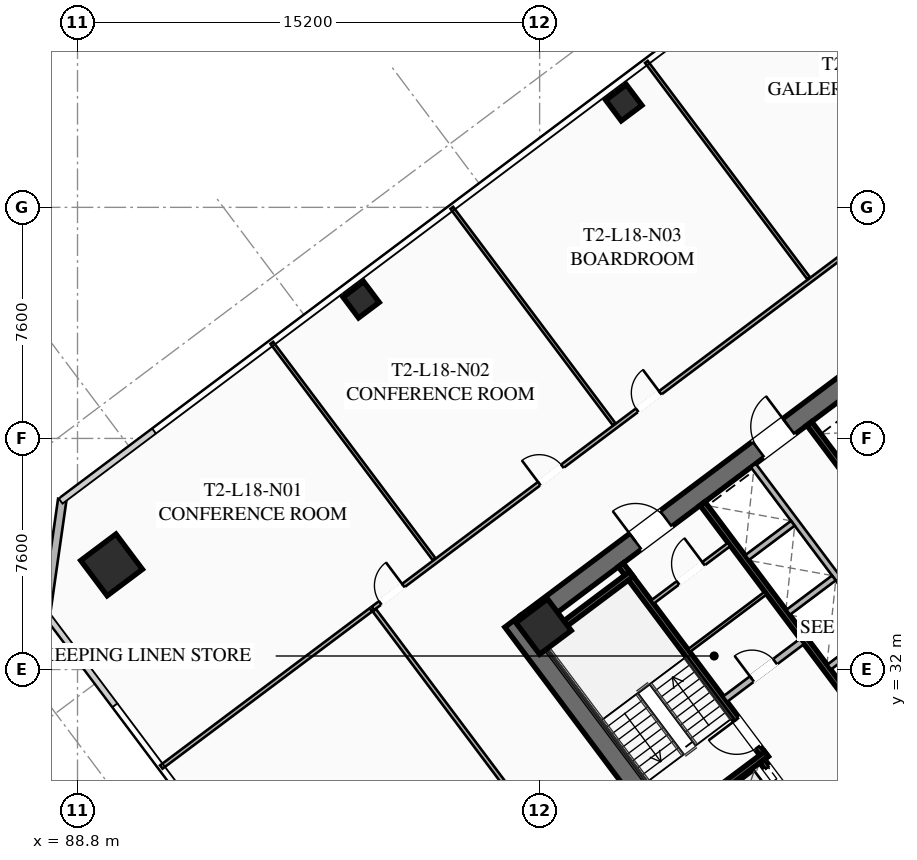
"""IFC4 building model, lengths in metres.
Left out: names, types, materials, properties, quantities, classifications, styles, units other than length and angle.
Written with IfcOpenShell. Run it as: python <this file> out.ifc"""

import sys

from ifc_helpers import new_model, si_unit, direction, frame, frame_2d, origin, origin_2d, place, context, subcontext, project, spatial, rectangle, hollow_rectangle, extrude, element, fill, save


model = new_model("IFC4")
c1 = context("Model", 3, precision=1e-05, world=origin(), true_north=direction((0.0, 1.0)))
c2 = subcontext(c1, "Body", "Model", "MODEL_VIEW")
j1 = project(units=[si_unit("LENGTHUNIT", "METRE"), si_unit("PLANEANGLEUNIT", "RADIAN")], contexts=[c1])
p1 = place(None, origin())
s1 = spatial("IfcSite", under=j1, at=p1, CompositionType="ELEMENT")
p2 = place(p1, origin())
s2 = spatial("IfcBuilding", under=s1, at=p2, CompositionType="ELEMENT")
p3 = place(p2, frame((0.0, 0.0, 70.75)))
s3 = spatial("IfcBuildingStorey", under=s2, at=p3, CompositionType="ELEMENT", Elevation=70.75)
p4 = place(p3, frame((112.476, 21.107, 0.0), z_axis=(0.0, 0.0, 1.0), x_axis=(-0.600005007985, 0.799996243986, 0.0)))
e1 = element("IfcWall", 1, at=p4, inside=s3, PredefinedType="SHEAR", context=c2, shape_type="SweptSolid", body=[
    extrude(rectangle(XDim=15.6, YDim=0.65, at=frame_2d((7.8, 0.0))), origin(), (0.0, 0.0, 1.0), 3.55),
])
p5 = place(p3, frame((124.429, 30.478, 0.0), z_axis=(0.0, 0.0, 1.0), x_axis=(-0.799998028465, -0.600002628705, 0.0)))
e2 = element("IfcWall", 2, at=p5, inside=s3, PredefinedType="SHEAR", context=c2, shape_type="SweptSolid", body=[
    extrude(rectangle(XDim=14.86, YDim=0.65, at=frame_2d((7.43, 0.0))), origin(), (0.0, 0.0, 1.0), 3.55),
])
p6 = place(p5, frame((9.13, 0.0, 0.0)))
e3 = element("IfcOpeningElement", 3, at=p6, cuts=e2, PredefinedType="OPENING", context=c2, shape_type="SweptSolid", body=[
    extrude(rectangle(XDim=1.25, YDim=2.25, at=frame_2d((0.625, 1.125))), frame((0.0, 0.335, 0.0), z_axis=(0.0, -1.0, 0.0), x_axis=(1.0, 0.0, 0.0)), (0.0, 0.0, 1.0), 0.67),
])
p7 = place(p5, frame((4.08, 0.0, 0.0)))
e4 = element("IfcOpeningElement", 4, at=p7, cuts=e2, PredefinedType="OPENING", context=c2, shape_type="SweptSolid", body=[
    extrude(rectangle(XDim=1.25, YDim=2.25, at=frame_2d((0.625, 1.125))), frame((0.0, 0.335, 0.0), z_axis=(0.0, -1.0, 0.0), x_axis=(1.0, 0.0, 0.0)), (0.0, 0.0, 1.0), 0.67),
])
p8 = place(p3, frame((103.571, 33.522, 0.0), z_axis=(0.0, 0.0, 1.0), x_axis=(0.799998028465, 0.600002628705, 0.0)))
e5 = element("IfcWall", 5, at=p8, inside=s3, PredefinedType="SHEAR", context=c2, shape_type="SweptSolid", body=[
    extrude(rectangle(XDim=14.86, YDim=0.65, at=frame_2d((7.43, 0.0))), origin(), (0.0, 0.0, 1.0), 3.55),
])
p9 = place(p8, frame((4.48, 0.0, 0.0)))
e6 = element("IfcOpeningElement", 6, at=p9, cuts=e5, PredefinedType="OPENING", context=c2, shape_type="SweptSolid", body=[
    extrude(rectangle(XDim=1.25, YDim=2.25, at=frame_2d((0.625, 1.125))), frame((0.0, 0.335, 0.0), z_axis=(0.0, -1.0, 0.0), x_axis=(1.0, 0.0, 0.0)), (0.0, 0.0, 1.0), 0.67),
])
p10 = place(p8, frame((9.53, 0.0, 0.0)))
e7 = element("IfcOpeningElement", 7, at=p10, cuts=e5, PredefinedType="OPENING", context=c2, shape_type="SweptSolid", body=[
    extrude(rectangle(XDim=1.25, YDim=2.25, at=frame_2d((0.625, 1.125))), frame((0.0, 0.335, 0.0), z_axis=(0.0, -1.0, 0.0), x_axis=(1.0, 0.0, 0.0)), (0.0, 0.0, 1.0), 0.67),
])
p11 = place(p3, frame((104.13, 33.41, 0.0), z_axis=(0.0, 0.0, 1.0), x_axis=(0.799999996291, 0.600000004945, 0.0)))
e8 = element("IfcColumn", 8, at=p11, inside=s3, PredefinedType="COLUMN", context=c2, shape_type="SweptSolid", body=[
    extrude(hollow_rectangle(XDim=1.3, YDim=1.3, WallThickness=0.05, at=origin_2d()), origin(), (0.0, 0.0, 1.0), 3.35),
])
p12 = place(p3, frame((89.92, 35.44, 0.0), z_axis=(0.0, 0.0, 1.0), x_axis=(0.799999996291, 0.600000004945, 0.0)))
e9 = element("IfcColumn", 9, at=p12, inside=s3, PredefinedType="COLUMN", context=c2, shape_type="SweptSolid", body=[
    extrude(hollow_rectangle(XDim=1.45, YDim=1.45, WallThickness=0.055, at=origin_2d()), origin(), (0.0, 0.0, 1.0), 3.35),
])
for number, where, z_axis, x_axis in (
    (10, (106.77, 50.64, 0.0), (0.0, 0.0, 1.0), (0.8, 0.6, 0.0)),
    (11, (98.13, 44.16, 0.0), (0.0, 0.0, 1.0), (0.8, 0.6, 0.0)),
):
    element("IfcColumn", number, at=place(p3, frame(where, z_axis=z_axis, x_axis=x_axis)), inside=s3, PredefinedType="COLUMN", context=c2, shape_type="SweptSolid", body=[
        extrude(hollow_rectangle(XDim=0.85, YDim=0.85, WallThickness=0.035, at=origin_2d()), origin(), (0.0, 0.0, 1.0), 3.35),
    ])
p13 = place(p3, frame((87.76, 33.82, 0.0), z_axis=(0.0, 0.0, 1.0), x_axis=(0.141430307517, 0.989948214866, 0.0)))
e12 = element("IfcWall", 12, at=p13, inside=s3, PredefinedType="SOLIDWALL", context=c2, shape_type="SweptSolid", body=[
    extrude(rectangle(XDim=3.818, YDim=0.28, at=frame_2d((1.909, 0.0))), origin(), (0.0, 0.0, 1.0), 3.35),
])
p14 = place(p3, frame((111.44, 29.08, 0.0), z_axis=(0.0, 0.0, 1.0), x_axis=(-0.600009827119, 0.799992629566, 0.0)))
e13 = element("IfcWall", 13, at=p14, inside=s3, PredefinedType="SHEAR", context=c2, shape_type="SweptSolid", body=[
    extrude(rectangle(XDim=7.95, YDim=0.2, at=frame_2d((3.975, 0.0))), origin(), (0.0, 0.0, 1.0), 3.35),
])
p15 = place(p14, frame((0.45, 0.0, 0.0)))
e14 = element("IfcOpeningElement", 14, at=p15, cuts=e13, PredefinedType="OPENING", context=c2, shape_type="SweptSolid", body=[
    extrude(rectangle(XDim=1.15, YDim=2.2, at=frame_2d((0.575, 1.1))), frame((0.0, 0.11, 0.0), z_axis=(0.0, -1.0, 0.0), x_axis=(1.0, 0.0, 0.0)), (0.0, 0.0, 1.0), 0.22),
])
for number, where, z_axis, x_axis in (
    (15, (108.476, 26.982, 0.0), (0.0, 0.0, 1.0), (0.8, 0.6, 0.0)),
    (16, (104.036, 32.902, 0.0), (0.0, 0.0, 1.0), (0.8, 0.6, 0.0)),
):
    element("IfcWall", number, at=place(p3, frame(where, z_axis=z_axis, x_axis=x_axis)), inside=s3, PredefinedType="SHEAR", context=c2, shape_type="SweptSolid", body=[
        extrude(rectangle(XDim=3.73, YDim=0.2, at=frame_2d((1.865, 0.0))), origin(), (0.0, 0.0, 1.0), 3.35),
    ])
p16 = place(p3, frame((117.938, 26.016, 0.0), z_axis=(0.0, 0.0, 1.0), x_axis=(-0.600005463273, 0.799995902516, 0.0)))
e17 = element("IfcWall", 17, at=p16, inside=s3, PredefinedType="SHEAR", context=c2, shape_type="SweptSolid", body=[
    extrude(rectangle(XDim=14.3, YDim=0.2, at=frame_2d((7.15, 0.0))), origin(), (0.0, 0.0, 1.0), 3.35),
])
p17 = place(p3, frame((110.104, 31.028, 0.0), z_axis=(0.0, 0.0, 1.0), x_axis=(0.800018601094, 0.59997519774, 0.0)))
e18 = element("IfcWall", 18, at=p17, inside=s3, PredefinedType="SOLIDWALL", context=c2, shape_type="SweptSolid", body=[
    extrude(rectangle(XDim=3.15, YDim=0.22, at=frame_2d((1.575, 0.0))), origin(), (0.0, 0.0, 1.0), 2.703),
])
p18 = place(p17, frame((1.1, 0.0, 0.0)))
e19 = element("IfcOpeningElement", 19, at=p18, cuts=e18, PredefinedType="OPENING", context=c2, shape_type="SweptSolid", body=[
    extrude(rectangle(XDim=0.95, YDim=2.05, at=frame_2d((0.475, 1.025))), frame((0.0, 0.12, 0.0), z_axis=(0.0, -1.0, 0.0), x_axis=(1.0, 0.0, 0.0)), (0.0, 0.0, 1.0), 0.24),
])
p19 = place(p3, frame((115.13, 23.91, 0.0), z_axis=(0.0, 0.0, 1.0), x_axis=(-0.599975393228, 0.800018454488, 0.0)))
e20 = element("IfcWall", 20, at=p19, inside=s3, PredefinedType="SHEAR", context=c2, shape_type="SweptSolid", body=[
    extrude(rectangle(XDim=6.35, YDim=0.2, at=frame_2d((3.175, 0.0))), origin(), (0.0, 0.0, 1.0), 3.35),
])
p20 = place(p19, frame((4.775, 0.0, 0.0)))
e21 = element("IfcOpeningElement", 21, at=p20, cuts=e20, PredefinedType="OPENING", context=c2, shape_type="SweptSolid", body=[
    extrude(rectangle(XDim=1.3, YDim=2.25, at=frame_2d((0.65, 1.125))), frame((0.0, 0.11, 0.0), z_axis=(0.0, -1.0, 0.0), x_axis=(1.0, 0.0, 0.0)), (0.0, 0.0, 1.0), 0.22),
])
p21 = place(p19, frame((2.775, 0.0, 0.0)))
e22 = element("IfcOpeningElement", 22, at=p21, cuts=e20, PredefinedType="OPENING", context=c2, shape_type="SweptSolid", body=[
    extrude(rectangle(XDim=1.3, YDim=2.25, at=frame_2d((0.65, 1.125))), frame((0.0, 0.11, 0.0), z_axis=(0.0, -1.0, 0.0), x_axis=(1.0, 0.0, 0.0)), (0.0, 0.0, 1.0), 0.22),
])
p22 = place(p19, frame((0.575, 0.0, 0.0)))
e23 = element("IfcOpeningElement", 23, at=p22, cuts=e20, PredefinedType="OPENING", context=c2, shape_type="SweptSolid", body=[
    extrude(rectangle(XDim=1.3, YDim=2.25, at=frame_2d((0.65, 1.125))), frame((0.0, 0.11, 0.0), z_axis=(0.0, -1.0, 0.0), x_axis=(1.0, 0.0, 0.0)), (0.0, 0.0, 1.0), 0.22),
])
p23 = place(p3, frame((112.87, 40.09, 0.0), z_axis=(0.0, 0.0, 1.0), x_axis=(0.599975393228, -0.800018454488, 0.0)))
e24 = element("IfcWall", 24, at=p23, inside=s3, PredefinedType="SHEAR", context=c2, shape_type="SweptSolid", body=[
    extrude(rectangle(XDim=6.35, YDim=0.2, at=frame_2d((3.175, 0.0))), origin(), (0.0, 0.0, 1.0), 3.35),
])
p24 = place(p3, frame((107.71, 34.22, 0.0), z_axis=(0.0, 0.0, 1.0), x_axis=(0.799981399002, 0.60002480053, 0.0)))
e25 = element("IfcWall", 25, at=p24, inside=s3, PredefinedType="PARTITIONING", context=c2, shape_type="SweptSolid", body=[
    extrude(rectangle(XDim=3.15, YDim=0.135, at=frame_2d((1.575, 0.0))), origin(), (0.0, 0.0, 1.0), 2.703),
])
p25 = place(p24, frame((1.05, 0.0, 0.0)))
e26 = element("IfcOpeningElement", 26, at=p25, cuts=e25, PredefinedType="OPENING", context=c2, shape_type="SweptSolid", body=[
    extrude(rectangle(XDim=1.05, YDim=2.2, at=frame_2d((0.525, 1.1))), frame((0.0, 0.077, 0.0), z_axis=(0.0, -1.0, 0.0), x_axis=(1.0, 0.0, 0.0)), (0.0, 0.0, 1.0), 0.155),
])
p26 = place(p3, frame((108.91, 32.62, 0.0), z_axis=(0.0, 0.0, 1.0), x_axis=(0.800018601094, 0.59997519774, 0.0)))
e27 = element("IfcWall", 27, at=p26, inside=s3, PredefinedType="PARTITIONING", context=c2, shape_type="SweptSolid", body=[
    extrude(rectangle(XDim=3.15, YDim=0.11, at=frame_2d((1.575, 0.0))), origin(), (0.0, 0.0, 1.0), 2.703),
])
p27 = place(p3, frame((115.11, 33.27, 0.0), z_axis=(0.0, 0.0, 1.0), x_axis=(-0.600011488909, 0.79999138319, 0.0)))
e28 = element("IfcWall", 28, at=p27, inside=s3, PredefinedType="SOLIDWALL", context=c2, shape_type="SweptSolid", body=[
    extrude(rectangle(XDim=6.8, YDim=0.2, at=frame_2d((3.4, 0.0))), origin(), (0.0, 0.0, 1.0), 3.35),
])
p28 = place(p3, frame((113.526, 32.082, 0.0), z_axis=(0.0, 0.0, 1.0), x_axis=(0.800046745961, 0.599937666993, 0.0)))
e29 = element("IfcWall", 29, at=p28, inside=s3, PredefinedType="SOLIDWALL", context=c2, shape_type="SweptSolid", body=[
    extrude(rectangle(XDim=1.88, YDim=0.2, at=frame_2d((0.94, 0.0))), origin(), (0.0, 0.0, 1.0), 3.35),
])
p29 = place(p3, frame((112.176, 33.882, 0.0), z_axis=(0.0, 0.0, 1.0), x_axis=(0.8, 0.6, 0.0)))
e30 = element("IfcWall", 30, at=p29, inside=s3, PredefinedType="SOLIDWALL", context=c2, shape_type="SweptSolid", body=[
    extrude(rectangle(XDim=1.88, YDim=0.2, at=frame_2d((0.94, 0.0))), origin(), (0.0, 0.0, 1.0), 3.35),
])
p30 = place(p3, frame((110.826, 35.682, 0.0), z_axis=(0.0, 0.0, 1.0), x_axis=(0.799984418148, 0.600020775241, 0.0)))
e31 = element("IfcWall", 31, at=p30, inside=s3, PredefinedType="SOLIDWALL", context=c2, shape_type="SweptSolid", body=[
    extrude(rectangle(XDim=1.88, YDim=0.2, at=frame_2d((0.94, 0.0))), origin(), (0.0, 0.0, 1.0), 3.35),
])
p31 = place(p3, frame((98.516, 34.012, 0.0), z_axis=(0.0, 0.0, 1.0), x_axis=(0.8, 0.6, 0.0)))
e32 = element("IfcWall", 32, at=p31, inside=s3, PredefinedType="PARTITIONING", context=c2, shape_type="SweptSolid", body=[
    extrude(rectangle(XDim=28.23, YDim=0.135, at=frame_2d((14.115, 0.0))), origin(), (0.0, 0.0, 1.0), 2.703),
])
p32 = place(p31, frame((0.3, 0.0, 0.0)))
e33 = element("IfcOpeningElement", 33, at=p32, cuts=e32, PredefinedType="OPENING", context=c2, shape_type="SweptSolid", body=[
    extrude(rectangle(XDim=0.95, YDim=2.05, at=frame_2d((0.475, 1.025))), frame((0.0, 0.077, 0.0), z_axis=(0.0, -1.0, 0.0), x_axis=(1.0, 0.0, 0.0)), (0.0, 0.0, 1.0), 0.155),
])
p33 = place(p31, frame((6.84, 0.0, 0.0)))
e34 = element("IfcOpeningElement", 34, at=p33, cuts=e32, PredefinedType="OPENING", context=c2, shape_type="SweptSolid", body=[
    extrude(rectangle(XDim=0.95, YDim=2.05, at=frame_2d((0.475, 1.025))), frame((0.0, 0.077, 0.0), z_axis=(0.0, -1.0, 0.0), x_axis=(1.0, 0.0, 0.0)), (0.0, 0.0, 1.0), 0.155),
])
p34 = place(p31, frame((10.863, 0.0, 0.0)))
e35 = element("IfcOpeningElement", 35, at=p34, cuts=e32, PredefinedType="OPENING", context=c2, shape_type="SweptSolid", body=[
    extrude(rectangle(XDim=0.95, YDim=2.05, at=frame_2d((0.475, 1.025))), frame((0.0, 0.077, 0.0), z_axis=(0.0, -1.0, 0.0), x_axis=(1.0, 0.0, 0.0)), (0.0, 0.0, 1.0), 0.155),
])
p35 = place(p31, frame((26.98, 0.0, 0.0)))
e36 = element("IfcOpeningElement", 36, at=p35, cuts=e32, PredefinedType="OPENING", context=c2, shape_type="SweptSolid", body=[
    extrude(rectangle(XDim=0.95, YDim=2.05, at=frame_2d((0.475, 1.025))), frame((0.0, 0.077, 0.0), z_axis=(0.0, -1.0, 0.0), x_axis=(1.0, 0.0, 0.0)), (0.0, 0.0, 1.0), 0.155),
])
for number, where, z_axis, x_axis in (
    (37, (100.532, 35.624, 0.0), (0.0, 0.0, 1.0), (-0.6, 0.8, 0.0)),
    (38, (106.452, 40.064, 0.0), (0.0, 0.0, 1.0), (-0.6, 0.8, 0.0)),
    (39, (112.852, 44.864, 0.0), (0.0, 0.0, 1.0), (-0.6, 0.8, 0.0)),
):
    element("IfcWall", number, at=place(p3, frame(where, z_axis=z_axis, x_axis=x_axis)), inside=s3, PredefinedType="PARTITIONING", context=c2, shape_type="SweptSolid", body=[
        extrude(rectangle(XDim=8.9, YDim=0.11, at=frame_2d((4.45, 0.0))), origin(), (0.0, 0.0, 1.0), 2.703),
    ])
p36 = place(p3, frame((134.18, 33.51, 0.0), z_axis=(0.0, 0.0, 1.0), x_axis=(-0.8, -0.6, 0.0)))
e40 = element("IfcWall", 40, at=p36, inside=s3, PredefinedType="PARTITIONING", context=c2, shape_type="SweptSolid", body=[
    extrude(rectangle(XDim=28.23, YDim=0.135, at=frame_2d((14.115, 0.0))), origin(), (0.0, 0.0, 1.0), 2.703),
])
p37 = place(p36, frame((26.9, 0.0, 0.0)))
e41 = element("IfcOpeningElement", 41, at=p37, cuts=e40, PredefinedType="OPENING", context=c2, shape_type="SweptSolid", body=[
    extrude(rectangle(XDim=0.95, YDim=2.05, at=frame_2d((0.475, 1.025))), frame((0.0, 0.077, 0.0), z_axis=(0.0, -1.0, 0.0), x_axis=(1.0, 0.0, 0.0)), (0.0, 0.0, 1.0), 0.155),
])
p38 = place(p36, frame((20.399, 0.0, 0.0)))
e42 = element("IfcOpeningElement", 42, at=p38, cuts=e40, PredefinedType="OPENING", context=c2, shape_type="SweptSolid", body=[
    extrude(rectangle(XDim=0.95, YDim=2.05, at=frame_2d((0.475, 1.025))), frame((0.0, 0.077, 0.0), z_axis=(0.0, -1.0, 0.0), x_axis=(1.0, 0.0, 0.0)), (0.0, 0.0, 1.0), 0.155),
])
p39 = place(p36, frame((16.339, 0.0, 0.0)))
e43 = element("IfcOpeningElement", 43, at=p39, cuts=e40, PredefinedType="OPENING", context=c2, shape_type="SweptSolid", body=[
    extrude(rectangle(XDim=0.95, YDim=2.05, at=frame_2d((0.475, 1.025))), frame((0.0, 0.077, 0.0), z_axis=(0.0, -1.0, 0.0), x_axis=(1.0, 0.0, 0.0)), (0.0, 0.0, 1.0), 0.155),
])
p40 = place(p36, frame((0.38, 0.0, 0.0)))
e44 = element("IfcOpeningElement", 44, at=p40, cuts=e40, PredefinedType="OPENING", context=c2, shape_type="SweptSolid", body=[
    extrude(rectangle(XDim=0.95, YDim=2.05, at=frame_2d((0.475, 1.025))), frame((0.0, 0.077, 0.0), z_axis=(0.0, -1.0, 0.0), x_axis=(1.0, 0.0, 0.0)), (0.0, 0.0, 1.0), 0.155),
])
p41 = place(p3, frame((111.548, 16.636, 0.0), z_axis=(0.0, 0.0, 1.0), x_axis=(-0.600003610192, 0.799997292343, 0.0)))
e45 = element("IfcWall", 45, at=p41, inside=s3, PredefinedType="PARTITIONING", context=c2, shape_type="SweptSolid", body=[
    extrude(rectangle(XDim=21.64, YDim=0.135, at=frame_2d((10.82, 0.0))), origin(), (0.0, 0.0, 1.0), 2.703),
])
p42 = place(p41, frame((0.3, 0.0, 0.0)))
e46 = element("IfcOpeningElement", 46, at=p42, cuts=e45, PredefinedType="OPENING", context=c2, shape_type="SweptSolid", body=[
    extrude(rectangle(XDim=0.95, YDim=2.05, at=frame_2d((0.475, 1.025))), frame((0.0, 0.077, 0.0), z_axis=(0.0, -1.0, 0.0), x_axis=(1.0, 0.0, 0.0)), (0.0, 0.0, 1.0), 0.155),
])
p43 = place(p3, frame((98.452, 33.964, 0.0), z_axis=(0.0, 0.0, 1.0), x_axis=(-0.799993202584, -0.600009063115, 0.0)))
e47 = element("IfcWall", 47, at=p43, inside=s3, PredefinedType="PARTITIONING", context=c2, shape_type="SweptSolid", body=[
    extrude(rectangle(XDim=8.62, YDim=0.135, at=frame_2d((4.31, 0.0))), origin(), (0.0, 0.0, 1.0), 2.703),
])
p44 = place(p9, origin())
e48 = element("IfcDoor", 48, at=p44, inside=s3, OperationType="SINGLE_SWING_LEFT", PredefinedType="DOOR", context=c2, shape_type="SweptSolid", body=[
    extrude(rectangle(XDim=1.25, YDim=2.25, at=frame_2d((0.625, 1.125))), frame((0.0, 0.025, 0.0), z_axis=(0.0, -1.0, 0.0), x_axis=(1.0, 0.0, 0.0)), (0.0, 0.0, 1.0), 0.05),
])
fill(e6, e48)
p45 = place(p10, origin())
e49 = element("IfcDoor", 49, at=p45, inside=s3, OperationType="SINGLE_SWING_RIGHT", PredefinedType="DOOR", context=c2, shape_type="SweptSolid", body=[
    extrude(rectangle(XDim=1.25, YDim=2.25, at=frame_2d((0.625, 1.125))), frame((0.0, 0.025, 0.0), z_axis=(0.0, -1.0, 0.0), x_axis=(1.0, 0.0, 0.0)), (0.0, 0.0, 1.0), 0.05),
])
fill(e7, e49)
p46 = place(p15, origin())
e50 = element("IfcDoor", 50, at=p46, inside=s3, OperationType="SINGLE_SWING_RIGHT", PredefinedType="DOOR", context=c2, shape_type="SweptSolid", body=[
    extrude(rectangle(XDim=1.15, YDim=2.2, at=frame_2d((0.575, 1.1))), frame((0.0, 0.025, 0.0), z_axis=(0.0, -1.0, 0.0), x_axis=(1.0, 0.0, 0.0)), (0.0, 0.0, 1.0), 0.05),
])
fill(e14, e50)
p47 = place(p25, origin())
e51 = element("IfcDoor", 51, at=p47, inside=s3, OperationType="SINGLE_SWING_RIGHT", PredefinedType="DOOR", context=c2, shape_type="SweptSolid", body=[
    extrude(rectangle(XDim=1.05, YDim=2.2, at=frame_2d((0.525, 1.1))), frame((0.0, 0.025, 0.0), z_axis=(0.0, -1.0, 0.0), x_axis=(1.0, 0.0, 0.0)), (0.0, 0.0, 1.0), 0.05),
])
fill(e26, e51)
p48 = place(p18, origin())
e52 = element("IfcDoor", 52, at=p48, inside=s3, OperationType="SINGLE_SWING_LEFT", PredefinedType="DOOR", context=c2, shape_type="SweptSolid", body=[
    extrude(rectangle(XDim=0.95, YDim=2.05, at=frame_2d((0.475, 1.025))), frame((0.0, 0.025, 0.0), z_axis=(0.0, -1.0, 0.0), x_axis=(1.0, 0.0, 0.0)), (0.0, 0.0, 1.0), 0.05),
])
fill(e19, e52)
p49 = place(p32, origin())
e53 = element("IfcDoor", 53, at=p49, inside=s3, OperationType="SINGLE_SWING_RIGHT", PredefinedType="DOOR", context=c2, shape_type="SweptSolid", body=[
    extrude(rectangle(XDim=0.95, YDim=2.05, at=frame_2d((0.475, 1.025))), frame((0.0, 0.025, 0.0), z_axis=(0.0, -1.0, 0.0), x_axis=(1.0, 0.0, 0.0)), (0.0, 0.0, 1.0), 0.05),
])
fill(e33, e53)
p50 = place(p33, origin())
e54 = element("IfcDoor", 54, at=p50, inside=s3, OperationType="SINGLE_SWING_LEFT", PredefinedType="DOOR", context=c2, shape_type="SweptSolid", body=[
    extrude(rectangle(XDim=0.95, YDim=2.05, at=frame_2d((0.475, 1.025))), frame((0.0, 0.025, 0.0), z_axis=(0.0, -1.0, 0.0), x_axis=(1.0, 0.0, 0.0)), (0.0, 0.0, 1.0), 0.05),
])
fill(e34, e54)
p51 = place(p34, origin())
e55 = element("IfcDoor", 55, at=p51, inside=s3, OperationType="SINGLE_SWING_RIGHT", PredefinedType="DOOR", context=c2, shape_type="SweptSolid", body=[
    extrude(rectangle(XDim=0.95, YDim=2.05, at=frame_2d((0.475, 1.025))), frame((0.0, 0.025, 0.0), z_axis=(0.0, -1.0, 0.0), x_axis=(1.0, 0.0, 0.0)), (0.0, 0.0, 1.0), 0.05),
])
fill(e35, e55)
p52 = place(p20, origin())
e56 = element("IfcDoor", 56, at=p52, inside=s3, OperationType="SLIDING_TO_LEFT", PredefinedType="DOOR", context=c2, shape_type="SweptSolid", body=[
    extrude(rectangle(XDim=1.3, YDim=2.25, at=frame_2d((0.65, 1.125))), frame((0.0, 0.025, 0.0), z_axis=(0.0, -1.0, 0.0), x_axis=(1.0, 0.0, 0.0)), (0.0, 0.0, 1.0), 0.05),
])
fill(e21, e56)
save(model, sys.argv[1])
